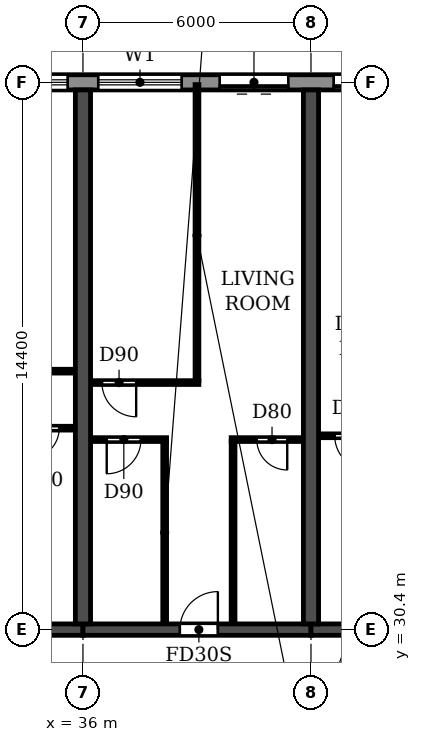
"""IFC4 building model, lengths in metres.
Left out: names, types, materials, properties, quantities, classifications, styles, units other than length and angle.
Written with IfcOpenShell. Run it as: python <this file> out.ifc"""

import sys

from ifc_helpers import new_model, si_unit, direction, frame, frame_2d, origin, place, context, subcontext, project, spatial, rectangle, extrude, element, fill, save


model = new_model("IFC4")
c1 = context("Model", 3, precision=1e-05, world=origin(), true_north=direction((0.0, 1.0)))
c2 = subcontext(c1, "Body", "Model", "MODEL_VIEW")
j1 = project(units=[si_unit("LENGTHUNIT", "METRE"), si_unit("PLANEANGLEUNIT", "RADIAN")], contexts=[c1])
p1 = place(None, origin())
s1 = spatial("IfcSite", under=j1, at=p1, CompositionType="ELEMENT")
p2 = place(p1, origin())
s2 = spatial("IfcBuilding", under=s1, at=p2, CompositionType="ELEMENT")
p3 = place(p2, frame((0.0, 0.0, 23.4)))
s3 = spatial("IfcBuildingStorey", under=s2, at=p3, CompositionType="ELEMENT", Elevation=23.4)
for number, where, z_axis, x_axis in (
    (1, (36.0, 30.55, 0.0), (0.0, 0.0, 1.0), (0.0, 1.0, 0.0)),
    (2, (42.0, 30.55, 0.0), (0.0, 0.0, 1.0), (0.0, 1.0, 0.0)),
):
    element("IfcWall", number, at=place(p3, frame(where, z_axis=z_axis, x_axis=x_axis)), inside=s3, PredefinedType="SHEAR", context=c2, shape_type="SweptSolid", body=[
        extrude(rectangle(XDim=14.05, YDim=0.4, at=frame_2d((7.025, 0.0))), origin(), (0.0, 0.0, 1.0), 3.05),
    ])
p4 = place(p3, frame((30.0, 30.4, 0.0), z_axis=(0.0, 0.0, 1.0), x_axis=(1.0, 0.0, 0.0)))
e3 = element("IfcWall", 3, at=p4, inside=s3, PredefinedType="SHEAR", context=c2, shape_type="SweptSolid", body=[
    extrude(rectangle(XDim=6.0, YDim=0.3, at=frame_2d((3.0, 0.0))), origin(), (0.0, 0.0, 1.0), 2.45),
])
p5 = place(p4, frame((2.55, 0.0, 0.0)))
e4 = element("IfcOpeningElement", 4, at=p5, cuts=e3, PredefinedType="OPENING", context=c2, shape_type="SweptSolid", body=[
    extrude(rectangle(XDim=1.0, YDim=2.1, at=frame_2d((0.5, 1.05))), frame((0.0, 0.16, 0.0), z_axis=(0.0, -1.0, 0.0), x_axis=(1.0, 0.0, 0.0)), (0.0, 0.0, 1.0), 0.32),
])
p6 = place(p3, frame((36.0, 30.4, 0.0), z_axis=(0.0, 0.0, 1.0), x_axis=(1.0, 0.0, 0.0)))
e5 = element("IfcWall", 5, at=p6, inside=s3, PredefinedType="SHEAR", context=c2, shape_type="SweptSolid", body=[
    extrude(rectangle(XDim=6.0, YDim=0.3, at=frame_2d((3.0, 0.0))), origin(), (0.0, 0.0, 1.0), 2.45),
])
p7 = place(p6, frame((2.55, 0.0, 0.0)))
e6 = element("IfcOpeningElement", 6, at=p7, cuts=e5, PredefinedType="OPENING", context=c2, shape_type="SweptSolid", body=[
    extrude(rectangle(XDim=1.0, YDim=2.1, at=frame_2d((0.5, 1.05))), frame((0.0, 0.16, 0.0), z_axis=(0.0, -1.0, 0.0), x_axis=(1.0, 0.0, 0.0)), (0.0, 0.0, 1.0), 0.32),
])
p8 = place(p3, frame((42.0, 30.4, 0.0), z_axis=(0.0, 0.0, 1.0), x_axis=(1.0, 0.0, 0.0)))
e7 = element("IfcWall", 7, at=p8, inside=s3, PredefinedType="SHEAR", context=c2, shape_type="SweptSolid", body=[
    extrude(rectangle(XDim=6.0, YDim=0.3, at=frame_2d((3.0, 0.0))), origin(), (0.0, 0.0, 1.0), 2.45),
])
p9 = place(p8, frame((2.55, 0.0, 0.0)))
e8 = element("IfcOpeningElement", 8, at=p9, cuts=e7, PredefinedType="OPENING", context=c2, shape_type="SweptSolid", body=[
    extrude(rectangle(XDim=1.0, YDim=2.1, at=frame_2d((0.5, 1.05))), frame((0.0, 0.16, 0.0), z_axis=(0.0, -1.0, 0.0), x_axis=(1.0, 0.0, 0.0)), (0.0, 0.0, 1.0), 0.32),
])
p10 = place(p3, frame((97.317, 44.8, 0.0), z_axis=(0.0, 0.0, 1.0), x_axis=(-1.0, 0.0, 0.0)))
e9 = element("IfcWall", 9, at=p10, inside=s3, PredefinedType="STANDARD", context=c2, shape_type="SweptSolid", body=[
    extrude(rectangle(XDim=92.634, YDim=0.4, at=frame_2d((46.317, 0.0))), origin(), (0.0, 0.0, 1.0), 3.05),
])
p11 = place(p10, frame((88.717, 0.0, 0.9)))
e10 = element("IfcOpeningElement", 10, at=p11, cuts=e9, PredefinedType="OPENING", context=c2, shape_type="SweptSolid", body=[
    extrude(rectangle(XDim=2.2, YDim=1.5, at=frame_2d((1.1, 0.75))), frame((0.0, 0.21, 0.0), z_axis=(0.0, -1.0, 0.0), x_axis=(1.0, 0.0, 0.0)), (0.0, 0.0, 1.0), 0.42),
])
p12 = place(p10, frame((85.917, 0.0, 0.0)))
e11 = element("IfcOpeningElement", 11, at=p12, cuts=e9, PredefinedType="OPENING", context=c2, shape_type="SweptSolid", body=[
    extrude(rectangle(XDim=1.8, YDim=2.4, at=frame_2d((0.9, 1.2))), frame((0.0, 0.21, 0.0), z_axis=(0.0, -1.0, 0.0), x_axis=(1.0, 0.0, 0.0)), (0.0, 0.0, 1.0), 0.42),
])
p13 = place(p10, frame((82.717, 0.0, 0.9)))
e12 = element("IfcOpeningElement", 12, at=p13, cuts=e9, PredefinedType="OPENING", context=c2, shape_type="SweptSolid", body=[
    extrude(rectangle(XDim=2.2, YDim=1.5, at=frame_2d((1.1, 0.75))), frame((0.0, 0.21, 0.0), z_axis=(0.0, -1.0, 0.0), x_axis=(1.0, 0.0, 0.0)), (0.0, 0.0, 1.0), 0.42),
])
p14 = place(p10, frame((79.717, 0.0, 0.9)))
e13 = element("IfcOpeningElement", 13, at=p14, cuts=e9, PredefinedType="OPENING", context=c2, shape_type="SweptSolid", body=[
    extrude(rectangle(XDim=2.2, YDim=1.5, at=frame_2d((1.1, 0.75))), frame((0.0, 0.21, 0.0), z_axis=(0.0, -1.0, 0.0), x_axis=(1.0, 0.0, 0.0)), (0.0, 0.0, 1.0), 0.42),
])
p15 = place(p10, frame((76.917, 0.0, 0.0)))
e14 = element("IfcOpeningElement", 14, at=p15, cuts=e9, PredefinedType="OPENING", context=c2, shape_type="SweptSolid", body=[
    extrude(rectangle(XDim=1.8, YDim=2.4, at=frame_2d((0.9, 1.2))), frame((0.0, 0.21, 0.0), z_axis=(0.0, -1.0, 0.0), x_axis=(1.0, 0.0, 0.0)), (0.0, 0.0, 1.0), 0.42),
])
p16 = place(p10, frame((73.717, 0.0, 0.9)))
e15 = element("IfcOpeningElement", 15, at=p16, cuts=e9, PredefinedType="OPENING", context=c2, shape_type="SweptSolid", body=[
    extrude(rectangle(XDim=2.2, YDim=1.5, at=frame_2d((1.1, 0.75))), frame((0.0, 0.21, 0.0), z_axis=(0.0, -1.0, 0.0), x_axis=(1.0, 0.0, 0.0)), (0.0, 0.0, 1.0), 0.42),
])
p17 = place(p10, frame((70.717, 0.0, 0.9)))
e16 = element("IfcOpeningElement", 16, at=p17, cuts=e9, PredefinedType="OPENING", context=c2, shape_type="SweptSolid", body=[
    extrude(rectangle(XDim=2.2, YDim=1.5, at=frame_2d((1.1, 0.75))), frame((0.0, 0.21, 0.0), z_axis=(0.0, -1.0, 0.0), x_axis=(1.0, 0.0, 0.0)), (0.0, 0.0, 1.0), 0.42),
])
p18 = place(p10, frame((67.717, 0.0, 0.9)))
e17 = element("IfcOpeningElement", 17, at=p18, cuts=e9, PredefinedType="OPENING", context=c2, shape_type="SweptSolid", body=[
    extrude(rectangle(XDim=2.2, YDim=1.5, at=frame_2d((1.1, 0.75))), frame((0.0, 0.21, 0.0), z_axis=(0.0, -1.0, 0.0), x_axis=(1.0, 0.0, 0.0)), (0.0, 0.0, 1.0), 0.42),
])
p19 = place(p10, frame((64.917, 0.0, 0.0)))
e18 = element("IfcOpeningElement", 18, at=p19, cuts=e9, PredefinedType="OPENING", context=c2, shape_type="SweptSolid", body=[
    extrude(rectangle(XDim=1.8, YDim=2.4, at=frame_2d((0.9, 1.2))), frame((0.0, 0.21, 0.0), z_axis=(0.0, -1.0, 0.0), x_axis=(1.0, 0.0, 0.0)), (0.0, 0.0, 1.0), 0.42),
])
p20 = place(p10, frame((61.717, 0.0, 0.9)))
e19 = element("IfcOpeningElement", 19, at=p20, cuts=e9, PredefinedType="OPENING", context=c2, shape_type="SweptSolid", body=[
    extrude(rectangle(XDim=2.2, YDim=1.5, at=frame_2d((1.1, 0.75))), frame((0.0, 0.21, 0.0), z_axis=(0.0, -1.0, 0.0), x_axis=(1.0, 0.0, 0.0)), (0.0, 0.0, 1.0), 0.42),
])
p21 = place(p10, frame((58.717, 0.0, 0.9)))
e20 = element("IfcOpeningElement", 20, at=p21, cuts=e9, PredefinedType="OPENING", context=c2, shape_type="SweptSolid", body=[
    extrude(rectangle(XDim=2.2, YDim=1.5, at=frame_2d((1.1, 0.75))), frame((0.0, 0.21, 0.0), z_axis=(0.0, -1.0, 0.0), x_axis=(1.0, 0.0, 0.0)), (0.0, 0.0, 1.0), 0.42),
])
p22 = place(p10, frame((55.917, 0.0, 0.0)))
e21 = element("IfcOpeningElement", 21, at=p22, cuts=e9, PredefinedType="OPENING", context=c2, shape_type="SweptSolid", body=[
    extrude(rectangle(XDim=1.8, YDim=2.4, at=frame_2d((0.9, 1.2))), frame((0.0, 0.21, 0.0), z_axis=(0.0, -1.0, 0.0), x_axis=(1.0, 0.0, 0.0)), (0.0, 0.0, 1.0), 0.42),
])
p23 = place(p10, frame((52.917, 0.0, 0.0)))
e22 = element("IfcOpeningElement", 22, at=p23, cuts=e9, PredefinedType="OPENING", context=c2, shape_type="SweptSolid", body=[
    extrude(rectangle(XDim=1.8, YDim=2.4, at=frame_2d((0.9, 1.2))), frame((0.0, 0.21, 0.0), z_axis=(0.0, -1.0, 0.0), x_axis=(1.0, 0.0, 0.0)), (0.0, 0.0, 1.0), 0.42),
])
p24 = place(p10, frame((49.717, 0.0, 0.9)))
e23 = element("IfcOpeningElement", 23, at=p24, cuts=e9, PredefinedType="OPENING", context=c2, shape_type="SweptSolid", body=[
    extrude(rectangle(XDim=2.2, YDim=1.5, at=frame_2d((1.1, 0.75))), frame((0.0, 0.21, 0.0), z_axis=(0.0, -1.0, 0.0), x_axis=(1.0, 0.0, 0.0)), (0.0, 0.0, 1.0), 0.42),
])
p25 = place(p10, frame((46.917, 0.0, 0.0)))
e24 = element("IfcOpeningElement", 24, at=p25, cuts=e9, PredefinedType="OPENING", context=c2, shape_type="SweptSolid", body=[
    extrude(rectangle(XDim=1.8, YDim=2.4, at=frame_2d((0.9, 1.2))), frame((0.0, 0.21, 0.0), z_axis=(0.0, -1.0, 0.0), x_axis=(1.0, 0.0, 0.0)), (0.0, 0.0, 1.0), 0.42),
])
p26 = place(p10, frame((43.717, 0.0, 0.9)))
e25 = element("IfcOpeningElement", 25, at=p26, cuts=e9, PredefinedType="OPENING", context=c2, shape_type="SweptSolid", body=[
    extrude(rectangle(XDim=2.2, YDim=1.5, at=frame_2d((1.1, 0.75))), frame((0.0, 0.21, 0.0), z_axis=(0.0, -1.0, 0.0), x_axis=(1.0, 0.0, 0.0)), (0.0, 0.0, 1.0), 0.42),
])
p27 = place(p10, frame((40.717, 0.0, 0.9)))
e26 = element("IfcOpeningElement", 26, at=p27, cuts=e9, PredefinedType="OPENING", context=c2, shape_type="SweptSolid", body=[
    extrude(rectangle(XDim=2.2, YDim=1.5, at=frame_2d((1.1, 0.75))), frame((0.0, 0.21, 0.0), z_axis=(0.0, -1.0, 0.0), x_axis=(1.0, 0.0, 0.0)), (0.0, 0.0, 1.0), 0.42),
])
p28 = place(p10, frame((37.917, 0.0, 0.0)))
e27 = element("IfcOpeningElement", 27, at=p28, cuts=e9, PredefinedType="OPENING", context=c2, shape_type="SweptSolid", body=[
    extrude(rectangle(XDim=1.8, YDim=2.4, at=frame_2d((0.9, 1.2))), frame((0.0, 0.21, 0.0), z_axis=(0.0, -1.0, 0.0), x_axis=(1.0, 0.0, 0.0)), (0.0, 0.0, 1.0), 0.42),
])
p29 = place(p10, frame((34.917, 0.0, 0.0)))
e28 = element("IfcOpeningElement", 28, at=p29, cuts=e9, PredefinedType="OPENING", context=c2, shape_type="SweptSolid", body=[
    extrude(rectangle(XDim=1.8, YDim=2.4, at=frame_2d((0.9, 1.2))), frame((0.0, 0.21, 0.0), z_axis=(0.0, -1.0, 0.0), x_axis=(1.0, 0.0, 0.0)), (0.0, 0.0, 1.0), 0.42),
])
p30 = place(p10, frame((31.717, 0.0, 0.9)))
e29 = element("IfcOpeningElement", 29, at=p30, cuts=e9, PredefinedType="OPENING", context=c2, shape_type="SweptSolid", body=[
    extrude(rectangle(XDim=2.2, YDim=1.5, at=frame_2d((1.1, 0.75))), frame((0.0, 0.21, 0.0), z_axis=(0.0, -1.0, 0.0), x_axis=(1.0, 0.0, 0.0)), (0.0, 0.0, 1.0), 0.42),
])
p31 = place(p10, frame((28.717, 0.0, 0.9)))
e30 = element("IfcOpeningElement", 30, at=p31, cuts=e9, PredefinedType="OPENING", context=c2, shape_type="SweptSolid", body=[
    extrude(rectangle(XDim=2.2, YDim=1.5, at=frame_2d((1.1, 0.75))), frame((0.0, 0.21, 0.0), z_axis=(0.0, -1.0, 0.0), x_axis=(1.0, 0.0, 0.0)), (0.0, 0.0, 1.0), 0.42),
])
p32 = place(p10, frame((25.717, 0.0, 0.9)))
e31 = element("IfcOpeningElement", 31, at=p32, cuts=e9, PredefinedType="OPENING", context=c2, shape_type="SweptSolid", body=[
    extrude(rectangle(XDim=2.2, YDim=1.5, at=frame_2d((1.1, 0.75))), frame((0.0, 0.21, 0.0), z_axis=(0.0, -1.0, 0.0), x_axis=(1.0, 0.0, 0.0)), (0.0, 0.0, 1.0), 0.42),
])
p33 = place(p10, frame((22.717, 0.0, 0.9)))
e32 = element("IfcOpeningElement", 32, at=p33, cuts=e9, PredefinedType="OPENING", context=c2, shape_type="SweptSolid", body=[
    extrude(rectangle(XDim=2.2, YDim=1.5, at=frame_2d((1.1, 0.75))), frame((0.0, 0.21, 0.0), z_axis=(0.0, -1.0, 0.0), x_axis=(1.0, 0.0, 0.0)), (0.0, 0.0, 1.0), 0.42),
])
p34 = place(p10, frame((19.917, 0.0, 0.0)))
e33 = element("IfcOpeningElement", 33, at=p34, cuts=e9, PredefinedType="OPENING", context=c2, shape_type="SweptSolid", body=[
    extrude(rectangle(XDim=1.8, YDim=2.4, at=frame_2d((0.9, 1.2))), frame((0.0, 0.21, 0.0), z_axis=(0.0, -1.0, 0.0), x_axis=(1.0, 0.0, 0.0)), (0.0, 0.0, 1.0), 0.42),
])
p35 = place(p10, frame((16.717, 0.0, 0.9)))
e34 = element("IfcOpeningElement", 34, at=p35, cuts=e9, PredefinedType="OPENING", context=c2, shape_type="SweptSolid", body=[
    extrude(rectangle(XDim=2.2, YDim=1.5, at=frame_2d((1.1, 0.75))), frame((0.0, 0.21, 0.0), z_axis=(0.0, -1.0, 0.0), x_axis=(1.0, 0.0, 0.0)), (0.0, 0.0, 1.0), 0.42),
])
p36 = place(p10, frame((13.717, 0.0, 0.9)))
e35 = element("IfcOpeningElement", 35, at=p36, cuts=e9, PredefinedType="OPENING", context=c2, shape_type="SweptSolid", body=[
    extrude(rectangle(XDim=2.2, YDim=1.5, at=frame_2d((1.1, 0.75))), frame((0.0, 0.21, 0.0), z_axis=(0.0, -1.0, 0.0), x_axis=(1.0, 0.0, 0.0)), (0.0, 0.0, 1.0), 0.42),
])
p37 = place(p10, frame((10.717, 0.0, 0.9)))
e36 = element("IfcOpeningElement", 36, at=p37, cuts=e9, PredefinedType="OPENING", context=c2, shape_type="SweptSolid", body=[
    extrude(rectangle(XDim=2.2, YDim=1.5, at=frame_2d((1.1, 0.75))), frame((0.0, 0.21, 0.0), z_axis=(0.0, -1.0, 0.0), x_axis=(1.0, 0.0, 0.0)), (0.0, 0.0, 1.0), 0.42),
])
p38 = place(p10, frame((7.917, 0.0, 0.0)))
e37 = element("IfcOpeningElement", 37, at=p38, cuts=e9, PredefinedType="OPENING", context=c2, shape_type="SweptSolid", body=[
    extrude(rectangle(XDim=1.8, YDim=2.4, at=frame_2d((0.9, 1.2))), frame((0.0, 0.21, 0.0), z_axis=(0.0, -1.0, 0.0), x_axis=(1.0, 0.0, 0.0)), (0.0, 0.0, 1.0), 0.42),
])
p39 = place(p10, frame((4.917, 0.0, 0.0)))
e38 = element("IfcOpeningElement", 38, at=p39, cuts=e9, PredefinedType="OPENING", context=c2, shape_type="SweptSolid", body=[
    extrude(rectangle(XDim=1.8, YDim=2.4, at=frame_2d((0.9, 1.2))), frame((0.0, 0.21, 0.0), z_axis=(0.0, -1.0, 0.0), x_axis=(1.0, 0.0, 0.0)), (0.0, 0.0, 1.0), 0.42),
])
p40 = place(p10, frame((1.717, 0.0, 0.9)))
e39 = element("IfcOpeningElement", 39, at=p40, cuts=e9, PredefinedType="OPENING", context=c2, shape_type="SweptSolid", body=[
    extrude(rectangle(XDim=2.2, YDim=1.5, at=frame_2d((1.1, 0.75))), frame((0.0, 0.21, 0.0), z_axis=(0.0, -1.0, 0.0), x_axis=(1.0, 0.0, 0.0)), (0.0, 0.0, 1.0), 0.42),
])
p41 = place(p3, frame((36.21, 35.4, 0.0), z_axis=(0.0, 0.0, 1.0), x_axis=(1.0, 0.0, 0.0)))
e40 = element("IfcWall", 40, at=p41, inside=s3, PredefinedType="PARTITIONING", context=c2, shape_type="SweptSolid", body=[
    extrude(rectangle(XDim=1.99, YDim=0.1, at=frame_2d((0.995, 0.0))), origin(), (0.0, 0.0, 1.0), 3.05),
])
p42 = place(p41, frame((0.415, 0.0, 0.0)))
e41 = element("IfcOpeningElement", 41, at=p42, cuts=e40, PredefinedType="OPENING", context=c2, shape_type="SweptSolid", body=[
    extrude(rectangle(XDim=0.9, YDim=2.1, at=frame_2d((0.45, 1.05))), frame((0.0, 0.06, 0.0), z_axis=(0.0, -1.0, 0.0), x_axis=(1.0, 0.0, 0.0)), (0.0, 0.0, 1.0), 0.12),
])
p43 = place(p3, frame((39.9, 35.4, 0.0), z_axis=(0.0, 0.0, 1.0), x_axis=(1.0, 0.0, 0.0)))
e42 = element("IfcWall", 42, at=p43, inside=s3, PredefinedType="PARTITIONING", context=c2, shape_type="SweptSolid", body=[
    extrude(rectangle(XDim=1.89, YDim=0.1, at=frame_2d((0.945, 0.0))), origin(), (0.0, 0.0, 1.0), 3.05),
])
p44 = place(p43, frame((0.675, 0.0, 0.0)))
e43 = element("IfcOpeningElement", 43, at=p44, cuts=e42, PredefinedType="OPENING", context=c2, shape_type="SweptSolid", body=[
    extrude(rectangle(XDim=0.8, YDim=2.1, at=frame_2d((0.4, 1.05))), frame((0.0, 0.06, 0.0), z_axis=(0.0, -1.0, 0.0), x_axis=(1.0, 0.0, 0.0)), (0.0, 0.0, 1.0), 0.12),
])
p45 = place(p3, frame((42.21, 35.5, 0.0), z_axis=(0.0, 0.0, 1.0), x_axis=(1.0, 0.0, 0.0)))
e44 = element("IfcWall", 44, at=p45, inside=s3, PredefinedType="PARTITIONING", context=c2, shape_type="SweptSolid", body=[
    extrude(rectangle(XDim=1.99, YDim=0.1, at=frame_2d((0.995, 0.0))), origin(), (0.0, 0.0, 1.0), 3.05),
])
p46 = place(p45, frame((0.415, 0.0, 0.0)))
e45 = element("IfcOpeningElement", 45, at=p46, cuts=e44, PredefinedType="OPENING", context=c2, shape_type="SweptSolid", body=[
    extrude(rectangle(XDim=0.9, YDim=2.1, at=frame_2d((0.45, 1.05))), frame((0.0, 0.06, 0.0), z_axis=(0.0, -1.0, 0.0), x_axis=(1.0, 0.0, 0.0)), (0.0, 0.0, 1.0), 0.12),
])
p47 = place(p3, frame((33.9, 35.7, 0.0), z_axis=(0.0, 0.0, 1.0), x_axis=(1.0, 0.0, 0.0)))
e46 = element("IfcWall", 46, at=p47, inside=s3, PredefinedType="PARTITIONING", context=c2, shape_type="SweptSolid", body=[
    extrude(rectangle(XDim=1.89, YDim=0.1, at=frame_2d((0.945, 0.0))), origin(), (0.0, 0.0, 1.0), 3.05),
])
p48 = place(p47, frame((0.675, 0.0, 0.0)))
e47 = element("IfcOpeningElement", 47, at=p48, cuts=e46, PredefinedType="OPENING", context=c2, shape_type="SweptSolid", body=[
    extrude(rectangle(XDim=0.8, YDim=2.1, at=frame_2d((0.4, 1.05))), frame((0.0, 0.06, 0.0), z_axis=(0.0, -1.0, 0.0), x_axis=(1.0, 0.0, 0.0)), (0.0, 0.0, 1.0), 0.12),
])
p49 = place(p3, frame((36.21, 36.9, 0.0), z_axis=(0.0, 0.0, 1.0), x_axis=(1.0, 0.0, 0.0)))
e48 = element("IfcWall", 48, at=p49, inside=s3, PredefinedType="PARTITIONING", context=c2, shape_type="SweptSolid", body=[
    extrude(rectangle(XDim=2.84, YDim=0.1, at=frame_2d((1.42, 0.0))), origin(), (0.0, 0.0, 1.0), 3.05),
])
p50 = place(p49, frame((0.29, 0.0, 0.0)))
e49 = element("IfcOpeningElement", 49, at=p50, cuts=e48, PredefinedType="OPENING", context=c2, shape_type="SweptSolid", body=[
    extrude(rectangle(XDim=0.9, YDim=2.1, at=frame_2d((0.45, 1.05))), frame((0.0, 0.06, 0.0), z_axis=(0.0, -1.0, 0.0), x_axis=(1.0, 0.0, 0.0)), (0.0, 0.0, 1.0), 0.12),
])
p51 = place(p3, frame((32.95, 37.2, 0.0), z_axis=(0.0, 0.0, 1.0), x_axis=(1.0, 0.0, 0.0)))
e50 = element("IfcWall", 50, at=p51, inside=s3, PredefinedType="PARTITIONING", context=c2, shape_type="SweptSolid", body=[
    extrude(rectangle(XDim=2.84, YDim=0.1, at=frame_2d((1.42, 0.0))), origin(), (0.0, 0.0, 1.0), 3.05),
])
p52 = place(p51, frame((0.55, 0.0, 0.0)))
e51 = element("IfcOpeningElement", 51, at=p52, cuts=e50, PredefinedType="OPENING", context=c2, shape_type="SweptSolid", body=[
    extrude(rectangle(XDim=0.9, YDim=2.1, at=frame_2d((0.45, 1.05))), frame((0.0, 0.06, 0.0), z_axis=(0.0, -1.0, 0.0), x_axis=(1.0, 0.0, 0.0)), (0.0, 0.0, 1.0), 0.12),
])
p53 = place(p3, frame((38.15, 30.56, 0.0), z_axis=(0.0, 0.0, 1.0), x_axis=(0.0, 1.0, 0.0)))
e52 = element("IfcWall", 52, at=p53, inside=s3, PredefinedType="PARTITIONING", context=c2, shape_type="SweptSolid", body=[
    extrude(rectangle(XDim=4.79, YDim=0.1, at=frame_2d((2.395, 0.0))), origin(), (0.0, 0.0, 1.0), 3.05),
])
p54 = place(p3, frame((39.0, 36.95, 0.0), z_axis=(0.0, 0.0, 1.0), x_axis=(0.0, 1.0, 0.0)))
e53 = element("IfcWall", 53, at=p54, inside=s3, PredefinedType="PARTITIONING", context=c2, shape_type="SweptSolid", body=[
    extrude(rectangle(XDim=7.79, YDim=0.1, at=frame_2d((3.895, 0.0))), origin(), (0.0, 0.0, 1.0), 3.05),
])
p55 = place(p3, frame((39.95, 30.56, 0.0), z_axis=(0.0, 0.0, 1.0), x_axis=(0.0, 1.0, 0.0)))
e54 = element("IfcWall", 54, at=p55, inside=s3, PredefinedType="PARTITIONING", context=c2, shape_type="SweptSolid", body=[
    extrude(rectangle(XDim=4.79, YDim=0.1, at=frame_2d((2.395, 0.0))), origin(), (0.0, 0.0, 1.0), 3.05),
])
p56 = place(p20, origin())
e55 = element("IfcWindow", 55, at=p56, inside=s3, PartitioningType="DOUBLE_PANEL_HORIZONTAL", PredefinedType="WINDOW", context=c2, shape_type="SweptSolid", body=[
    extrude(rectangle(XDim=2.2, YDim=1.5, at=frame_2d((1.1, 0.75))), frame((0.0, 0.03, 0.0), z_axis=(0.0, -1.0, 0.0), x_axis=(1.0, 0.0, 0.0)), (0.0, 0.0, 1.0), 0.06),
])
fill(e19, e55)
p57 = place(p21, origin())
e56 = element("IfcWindow", 56, at=p57, inside=s3, PartitioningType="DOUBLE_PANEL_HORIZONTAL", PredefinedType="WINDOW", context=c2, shape_type="SweptSolid", body=[
    extrude(rectangle(XDim=2.2, YDim=1.5, at=frame_2d((1.1, 0.75))), frame((0.0, 0.03, 0.0), z_axis=(0.0, -1.0, 0.0), x_axis=(1.0, 0.0, 0.0)), (0.0, 0.0, 1.0), 0.06),
])
fill(e20, e56)
p58 = place(p22, origin())
e57 = element("IfcDoor", 57, at=p58, inside=s3, OperationType="DOUBLE_DOOR_SLIDING", PredefinedType="DOOR", context=c2, shape_type="SweptSolid", body=[
    extrude(rectangle(XDim=1.8, YDim=2.4, at=frame_2d((0.9, 1.2))), frame((0.0, 0.025, 0.0), z_axis=(0.0, -1.0, 0.0), x_axis=(1.0, 0.0, 0.0)), (0.0, 0.0, 1.0), 0.05),
])
fill(e21, e57)
p59 = place(p23, origin())
e58 = element("IfcDoor", 58, at=p59, inside=s3, OperationType="DOUBLE_DOOR_SLIDING", PredefinedType="DOOR", context=c2, shape_type="SweptSolid", body=[
    extrude(rectangle(XDim=1.8, YDim=2.4, at=frame_2d((0.9, 1.2))), frame((0.0, 0.025, 0.0), z_axis=(0.0, -1.0, 0.0), x_axis=(1.0, 0.0, 0.0)), (0.0, 0.0, 1.0), 0.05),
])
fill(e22, e58)
p60 = place(p48, frame((0.8, 0.0, 0.0), z_axis=(0.0, 0.0, 1.0), x_axis=(-1.0, 0.0, 0.0)))
e59 = element("IfcDoor", 59, at=p60, inside=s3, OperationType="SINGLE_SWING_RIGHT", PredefinedType="DOOR", context=c2, shape_type="SweptSolid", body=[
    extrude(rectangle(XDim=0.8, YDim=2.1, at=frame_2d((0.4, 1.05))), frame((0.0, 0.025, 0.0), z_axis=(0.0, -1.0, 0.0), x_axis=(1.0, 0.0, 0.0)), (0.0, 0.0, 1.0), 0.05),
])
fill(e47, e59)
p61 = place(p50, frame((0.9, 0.0, 0.0), z_axis=(0.0, 0.0, 1.0), x_axis=(-1.0, 0.0, 0.0)))
e60 = element("IfcDoor", 60, at=p61, inside=s3, OperationType="SINGLE_SWING_LEFT", PredefinedType="DOOR", context=c2, shape_type="SweptSolid", body=[
    extrude(rectangle(XDim=0.9, YDim=2.1, at=frame_2d((0.45, 1.05))), frame((0.0, 0.025, 0.0), z_axis=(0.0, -1.0, 0.0), x_axis=(1.0, 0.0, 0.0)), (0.0, 0.0, 1.0), 0.05),
])
fill(e49, e60)
p62 = place(p42, frame((0.9, 0.0, 0.0), z_axis=(0.0, 0.0, 1.0), x_axis=(-1.0, 0.0, 0.0)))
e61 = element("IfcDoor", 61, at=p62, inside=s3, OperationType="SINGLE_SWING_RIGHT", PredefinedType="DOOR", context=c2, shape_type="SweptSolid", body=[
    extrude(rectangle(XDim=0.9, YDim=2.1, at=frame_2d((0.45, 1.05))), frame((0.0, 0.025, 0.0), z_axis=(0.0, -1.0, 0.0), x_axis=(1.0, 0.0, 0.0)), (0.0, 0.0, 1.0), 0.05),
])
fill(e41, e61)
p63 = place(p7, origin())
e62 = element("IfcDoor", 62, at=p63, inside=s3, OperationType="SINGLE_SWING_RIGHT", PredefinedType="DOOR", context=c2, shape_type="SweptSolid", body=[
    extrude(rectangle(XDim=1.0, YDim=2.1, at=frame_2d((0.5, 1.05))), frame((0.0, 0.025, 0.0), z_axis=(0.0, -1.0, 0.0), x_axis=(1.0, 0.0, 0.0)), (0.0, 0.0, 1.0), 0.05),
])
fill(e6, e62)
p64 = place(p44, frame((0.8, 0.0, 0.0), z_axis=(0.0, 0.0, 1.0), x_axis=(-1.0, 0.0, 0.0)))
e63 = element("IfcDoor", 63, at=p64, inside=s3, OperationType="SINGLE_SWING_LEFT", PredefinedType="DOOR", context=c2, shape_type="SweptSolid", body=[
    extrude(rectangle(XDim=0.8, YDim=2.1, at=frame_2d((0.4, 1.05))), frame((0.0, 0.025, 0.0), z_axis=(0.0, -1.0, 0.0), x_axis=(1.0, 0.0, 0.0)), (0.0, 0.0, 1.0), 0.05),
])
fill(e43, e63)
p65 = place(p46, frame((0.9, 0.0, 0.0), z_axis=(0.0, 0.0, 1.0), x_axis=(-1.0, 0.0, 0.0)))
e64 = element("IfcDoor", 64, at=p65, inside=s3, OperationType="SINGLE_SWING_LEFT", PredefinedType="DOOR", context=c2, shape_type="SweptSolid", body=[
    extrude(rectangle(XDim=0.9, YDim=2.1, at=frame_2d((0.45, 1.05))), frame((0.0, 0.025, 0.0), z_axis=(0.0, -1.0, 0.0), x_axis=(1.0, 0.0, 0.0)), (0.0, 0.0, 1.0), 0.05),
])
fill(e45, e64)
save(model, sys.argv[1])
